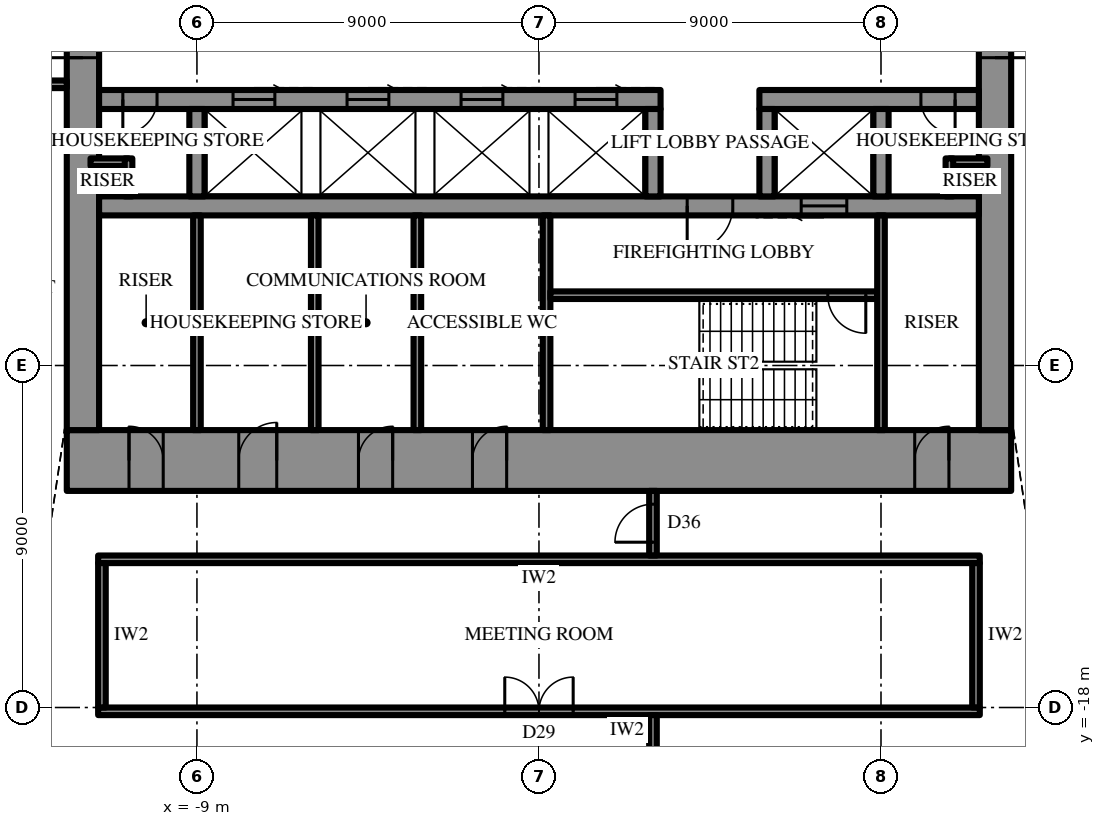
"""IFC4 building model, lengths in metres.
Left out: names, types, materials, properties, quantities, classifications, styles, units other than length and angle.
Written with IfcOpenShell. Run it as: python <this file> out.ifc"""

import sys

from ifc_helpers import new_model, si_unit, direction, frame, frame_2d, origin, place, context, subcontext, project, spatial, rectangle, extrude, element, fill, save


model = new_model("IFC4")
c1 = context("Model", 3, precision=1e-05, world=origin(), true_north=direction((0.0, 1.0)))
c2 = subcontext(c1, "Body", "Model", "MODEL_VIEW")
j1 = project(units=[si_unit("LENGTHUNIT", "METRE"), si_unit("PLANEANGLEUNIT", "RADIAN")], contexts=[c1])
p1 = place(None, origin())
s1 = spatial("IfcSite", under=j1, at=p1, CompositionType="ELEMENT")
p2 = place(p1, origin())
s2 = spatial("IfcBuilding", under=s1, at=p2, CompositionType="ELEMENT")
p3 = place(p2, frame((0.0, 0.0, 353.5)))
s3 = spatial("IfcBuildingStorey", under=s2, at=p3, CompositionType="ELEMENT", Elevation=353.5)
p4 = place(p3, frame((12.425, -11.5, 0.0), z_axis=(0.0, 0.0, 1.0), x_axis=(-1.0, 0.0, 0.0)))
e1 = element("IfcWall", 1, at=p4, inside=s3, PredefinedType="SHEAR", context=c2, shape_type="SweptSolid", body=[
    extrude(rectangle(XDim=24.85, YDim=1.6, at=frame_2d((12.425, 0.0))), origin(), (0.0, 0.0, 1.0), 4.2),
])
p5 = place(p4, frame((13.275, 0.0, 0.0)))
e2 = element("IfcOpeningElement", 2, at=p5, cuts=e1, PredefinedType="OPENING", context=c2, shape_type="SweptSolid", body=[
    extrude(rectangle(XDim=0.9, YDim=2.2, at=frame_2d((0.45, 1.1))), frame((0.0, 0.81, 0.0), z_axis=(0.0, -1.0, 0.0), x_axis=(1.0, 0.0, 0.0)), (0.0, 0.0, 1.0), 1.62),
])
p6 = place(p4, frame((16.275, 0.0, 0.0)))
e3 = element("IfcOpeningElement", 3, at=p6, cuts=e1, PredefinedType="OPENING", context=c2, shape_type="SweptSolid", body=[
    extrude(rectangle(XDim=0.9, YDim=2.2, at=frame_2d((0.45, 1.1))), frame((0.0, 0.81, 0.0), z_axis=(0.0, -1.0, 0.0), x_axis=(1.0, 0.0, 0.0)), (0.0, 0.0, 1.0), 1.62),
])
p7 = place(p4, frame((19.325, 0.0, 0.0)))
e4 = element("IfcOpeningElement", 4, at=p7, cuts=e1, PredefinedType="OPENING", context=c2, shape_type="SweptSolid", body=[
    extrude(rectangle(XDim=1.0, YDim=2.2, at=frame_2d((0.5, 1.1))), frame((0.0, 0.81, 0.0), z_axis=(0.0, -1.0, 0.0), x_axis=(1.0, 0.0, 0.0)), (0.0, 0.0, 1.0), 1.62),
])
p8 = place(p4, frame((1.637, 0.0, 0.0)))
e5 = element("IfcOpeningElement", 5, at=p8, cuts=e1, PredefinedType="OPENING", context=c2, shape_type="SweptSolid", body=[
    extrude(rectangle(XDim=0.9, YDim=2.2, at=frame_2d((0.45, 1.1))), frame((0.0, 0.81, 0.0), z_axis=(0.0, -1.0, 0.0), x_axis=(1.0, 0.0, 0.0)), (0.0, 0.0, 1.0), 1.62),
])
p9 = place(p4, frame((22.312, 0.0, 0.0)))
e6 = element("IfcOpeningElement", 6, at=p9, cuts=e1, PredefinedType="OPENING", context=c2, shape_type="SweptSolid", body=[
    extrude(rectangle(XDim=0.9, YDim=2.2, at=frame_2d((0.45, 1.1))), frame((0.0, 0.81, 0.0), z_axis=(0.0, -1.0, 0.0), x_axis=(1.0, 0.0, 0.0)), (0.0, 0.0, 1.0), 1.62),
])
p10 = place(p3, frame((12.0, -10.7, 0.0), z_axis=(0.0, 0.0, 1.0), x_axis=(0.0, 1.0, 0.0)))
e7 = element("IfcWall", 7, at=p10, inside=s3, PredefinedType="SHEAR", context=c2, shape_type="SweptSolid", body=[
    extrude(rectangle(XDim=21.4, YDim=0.85, at=frame_2d((10.7, 0.0))), origin(), (0.0, 0.0, 1.0), 4.2),
])
p11 = place(p10, frame((9.8, 0.0, 0.0)))
e8 = element("IfcOpeningElement", 8, at=p11, cuts=e7, PredefinedType="OPENING", context=c2, shape_type="SweptSolid", body=[
    extrude(rectangle(XDim=1.8, YDim=2.4, at=frame_2d((0.9, 1.2))), frame((0.0, 0.435, 0.0), z_axis=(0.0, -1.0, 0.0), x_axis=(1.0, 0.0, 0.0)), (0.0, 0.0, 1.0), 0.87),
])
p12 = place(p3, frame((-12.0, 10.7, 0.0), z_axis=(0.0, 0.0, 1.0), x_axis=(0.0, -1.0, 0.0)))
e9 = element("IfcWall", 9, at=p12, inside=s3, PredefinedType="SHEAR", context=c2, shape_type="SweptSolid", body=[
    extrude(rectangle(XDim=21.4, YDim=0.85, at=frame_2d((10.7, 0.0))), origin(), (0.0, 0.0, 1.0), 4.2),
])
p13 = place(p12, frame((9.8, 0.0, 0.0)))
e10 = element("IfcOpeningElement", 10, at=p13, cuts=e9, PredefinedType="OPENING", context=c2, shape_type="SweptSolid", body=[
    extrude(rectangle(XDim=1.8, YDim=2.4, at=frame_2d((0.9, 1.2))), frame((0.0, 0.435, 0.0), z_axis=(0.0, -1.0, 0.0), x_axis=(1.0, 0.0, 0.0)), (0.0, 0.0, 1.0), 0.87),
])
p14 = place(p3, frame((11.575, -2.0, 0.0), z_axis=(0.0, 0.0, 1.0), x_axis=(-1.0, 0.0, 0.0)))
e11 = element("IfcWall", 11, at=p14, inside=s3, PredefinedType="SHEAR", context=c2, shape_type="SweptSolid", body=[
    extrude(rectangle(XDim=5.775, YDim=0.5, at=frame_2d((2.887, 0.0))), origin(), (0.0, 0.0, 1.0), 4.2),
])
p15 = place(p14, frame((0.625, 0.0, 0.0)))
e12 = element("IfcOpeningElement", 12, at=p15, cuts=e11, PredefinedType="OPENING", context=c2, shape_type="SweptSolid", body=[
    extrude(rectangle(XDim=0.9, YDim=2.2, at=frame_2d((0.45, 1.1))), frame((0.0, 0.26, 0.0), z_axis=(0.0, -1.0, 0.0), x_axis=(1.0, 0.0, 0.0)), (0.0, 0.0, 1.0), 0.52),
])
p16 = place(p3, frame((3.2, -2.0, 0.0), z_axis=(0.0, 0.0, 1.0), x_axis=(-1.0, 0.0, 0.0)))
e13 = element("IfcWall", 13, at=p16, inside=s3, PredefinedType="SHEAR", context=c2, shape_type="SweptSolid", body=[
    extrude(rectangle(XDim=14.775, YDim=0.5, at=frame_2d((7.387, 0.0))), origin(), (0.0, 0.0, 1.0), 4.2),
])
p17 = place(p16, frame((13.25, 0.0, 0.0)))
e14 = element("IfcOpeningElement", 14, at=p17, cuts=e13, PredefinedType="OPENING", context=c2, shape_type="SweptSolid", body=[
    extrude(rectangle(XDim=0.9, YDim=2.2, at=frame_2d((0.45, 1.1))), frame((0.0, 0.26, 0.0), z_axis=(0.0, -1.0, 0.0), x_axis=(1.0, 0.0, 0.0)), (0.0, 0.0, 1.0), 0.52),
])
p18 = place(p16, frame((1.15, 0.0, 0.0)))
e15 = element("IfcOpeningElement", 15, at=p18, cuts=e13, PredefinedType="OPENING", context=c2, shape_type="SweptSolid", body=[
    extrude(rectangle(XDim=1.1, YDim=2.2, at=frame_2d((0.55, 1.1))), frame((0.0, 0.26, 0.0), z_axis=(0.0, -1.0, 0.0), x_axis=(1.0, 0.0, 0.0)), (0.0, 0.0, 1.0), 0.52),
])
p19 = place(p16, frame((4.15, 0.0, 0.0)))
e16 = element("IfcOpeningElement", 16, at=p19, cuts=e13, PredefinedType="OPENING", context=c2, shape_type="SweptSolid", body=[
    extrude(rectangle(XDim=1.1, YDim=2.2, at=frame_2d((0.55, 1.1))), frame((0.0, 0.26, 0.0), z_axis=(0.0, -1.0, 0.0), x_axis=(1.0, 0.0, 0.0)), (0.0, 0.0, 1.0), 0.52),
])
p20 = place(p16, frame((7.15, 0.0, 0.0)))
e17 = element("IfcOpeningElement", 17, at=p20, cuts=e13, PredefinedType="OPENING", context=c2, shape_type="SweptSolid", body=[
    extrude(rectangle(XDim=1.1, YDim=2.2, at=frame_2d((0.55, 1.1))), frame((0.0, 0.26, 0.0), z_axis=(0.0, -1.0, 0.0), x_axis=(1.0, 0.0, 0.0)), (0.0, 0.0, 1.0), 0.52),
])
p21 = place(p16, frame((10.15, 0.0, 0.0)))
e18 = element("IfcOpeningElement", 18, at=p21, cuts=e13, PredefinedType="OPENING", context=c2, shape_type="SweptSolid", body=[
    extrude(rectangle(XDim=1.1, YDim=2.2, at=frame_2d((0.55, 1.1))), frame((0.0, 0.26, 0.0), z_axis=(0.0, -1.0, 0.0), x_axis=(1.0, 0.0, 0.0)), (0.0, 0.0, 1.0), 0.52),
])
p22 = place(p3, frame((11.575, -4.8, 0.0), z_axis=(0.0, 0.0, 1.0), x_axis=(-1.0, 0.0, 0.0)))
e19 = element("IfcWall", 19, at=p22, inside=s3, PredefinedType="SHEAR", context=c2, shape_type="SweptSolid", body=[
    extrude(rectangle(XDim=23.15, YDim=0.5, at=frame_2d((11.575, 0.0))), origin(), (0.0, 0.0, 1.0), 4.2),
])
p23 = place(p22, frame((6.475, 0.0, 0.0)))
e20 = element("IfcOpeningElement", 20, at=p23, cuts=e19, PredefinedType="OPENING", context=c2, shape_type="SweptSolid", body=[
    extrude(rectangle(XDim=1.2, YDim=2.2, at=frame_2d((0.6, 1.1))), frame((0.0, 0.26, 0.0), z_axis=(0.0, -1.0, 0.0), x_axis=(1.0, 0.0, 0.0)), (0.0, 0.0, 1.0), 0.52),
])
p24 = place(p22, frame((3.475, 0.0, 0.0)))
e21 = element("IfcOpeningElement", 21, at=p24, cuts=e19, PredefinedType="OPENING", context=c2, shape_type="SweptSolid", body=[
    extrude(rectangle(XDim=1.2, YDim=2.2, at=frame_2d((0.6, 1.1))), frame((0.0, 0.26, 0.0), z_axis=(0.0, -1.0, 0.0), x_axis=(1.0, 0.0, 0.0)), (0.0, 0.0, 1.0), 0.52),
])
for number, where, z_axis, x_axis in (
    (22, (9.0, -2.25, 0.0), (0.0, 0.0, 1.0), (0.0, -1.0, 0.0)),
    (23, (6.0, -2.25, 0.0), (0.0, 0.0, 1.0), (0.0, -1.0, 0.0)),
    (24, (3.0, -2.25, 0.0), (0.0, 0.0, 1.0), (0.0, -1.0, 0.0)),
    (25, (-9.0, -2.25, 0.0), (0.0, 0.0, 1.0), (0.0, -1.0, 0.0)),
):
    element("IfcWall", number, at=place(p3, frame(where, z_axis=z_axis, x_axis=x_axis)), inside=s3, PredefinedType="SHEAR", context=c2, shape_type="SweptSolid", body=[
        extrude(rectangle(XDim=2.3, YDim=0.4, at=frame_2d((1.15, 0.0))), origin(), (0.0, 0.0, 1.0), 4.2),
    ])
p25 = place(p3, frame((0.2, -5.05, 0.0), z_axis=(0.0, 0.0, 1.0), x_axis=(0.0, -1.0, 0.0)))
e26 = element("IfcWall", 26, at=p25, inside=s3, PredefinedType="SHEAR", context=c2, shape_type="SweptSolid", body=[
    extrude(rectangle(XDim=5.65, YDim=0.2, at=frame_2d((2.825, 0.0))), origin(), (0.0, 0.0, 1.0), 4.2),
])
p26 = place(p3, frame((8.9, -7.15, 0.0), z_axis=(0.0, 0.0, 1.0), x_axis=(-1.0, 0.0, 0.0)))
e27 = element("IfcWall", 27, at=p26, inside=s3, PredefinedType="SHEAR", context=c2, shape_type="SweptSolid", body=[
    extrude(rectangle(XDim=8.6, YDim=0.2, at=frame_2d((4.3, 0.0))), origin(), (0.0, 0.0, 1.0), 4.2),
])
p27 = place(p26, frame((0.3, 0.0, 0.0)))
e28 = element("IfcOpeningElement", 28, at=p27, cuts=e27, PredefinedType="OPENING", context=c2, shape_type="SweptSolid", body=[
    extrude(rectangle(XDim=1.0, YDim=2.2, at=frame_2d((0.5, 1.1))), frame((0.0, 0.11, 0.0), z_axis=(0.0, -1.0, 0.0), x_axis=(1.0, 0.0, 0.0)), (0.0, 0.0, 1.0), 0.22),
])
for number, where, z_axis, x_axis in (
    (29, (9.0, -5.05, 0.0), (0.0, 0.0, 1.0), (0.0, -1.0, 0.0)),
    (30, (-9.0, -5.05, 0.0), (0.0, 0.0, 1.0), (0.0, -1.0, 0.0)),
    (31, (-3.2, -5.05, 0.0), (0.0, 0.0, 1.0), (0.0, -1.0, 0.0)),
    (32, (-5.9, -5.05, 0.0), (0.0, 0.0, 1.0), (0.0, -1.0, 0.0)),
):
    element("IfcWall", number, at=place(p3, frame(where, z_axis=z_axis, x_axis=x_axis)), inside=s3, PredefinedType="PARTITIONING", context=c2, shape_type="SweptSolid", body=[
        extrude(rectangle(XDim=5.65, YDim=0.2, at=frame_2d((2.825, 0.0))), origin(), (0.0, 0.0, 1.0), 4.0),
    ])
for number, where, z_axis, x_axis in (
    (33, (11.8, -3.65, 0.0), (0.0, 0.0, 1.0), (-1.0, 0.0, 0.0)),
    (34, (10.8, -3.55, 0.0), (0.0, 0.0, 1.0), (0.0, -1.0, 0.0)),
    (35, (-10.8, -3.65, 0.0), (0.0, 0.0, 1.0), (-1.0, 0.0, 0.0)),
    (36, (-10.8, -3.55, 0.0), (0.0, 0.0, 1.0), (0.0, -1.0, 0.0)),
):
    element("IfcWall", number, at=place(p3, frame(where, z_axis=z_axis, x_axis=x_axis)), inside=s3, PredefinedType="PARTITIONING", context=c2, shape_type="SweptSolid", body=[
        extrude(rectangle(XDim=1.0, YDim=0.2, at=frame_2d((0.5, 0.0))), origin(), (0.0, 0.0, 1.0), 4.0),
    ])
p28 = place(p3, frame((11.6, -14.1, 0.0), z_axis=(0.0, 0.0, 1.0), x_axis=(-1.0, 0.0, 0.0)))
e37 = element("IfcWall", 37, at=p28, inside=s3, PredefinedType="PARTITIONING", context=c2, shape_type="SweptSolid", body=[
    extrude(rectangle(XDim=23.2, YDim=0.2, at=frame_2d((11.6, 0.0))), origin(), (0.0, 0.0, 1.0), 4.0),
])
p29 = place(p3, frame((11.6, -18.1, 0.0), z_axis=(0.0, 0.0, 1.0), x_axis=(-1.0, 0.0, 0.0)))
e38 = element("IfcWall", 38, at=p29, inside=s3, PredefinedType="PARTITIONING", context=c2, shape_type="SweptSolid", body=[
    extrude(rectangle(XDim=23.2, YDim=0.2, at=frame_2d((11.6, 0.0))), origin(), (0.0, 0.0, 1.0), 4.0),
])
p30 = place(p29, frame((10.7, 0.0, 0.0)))
e39 = element("IfcOpeningElement", 39, at=p30, cuts=e38, PredefinedType="OPENING", context=c2, shape_type="SweptSolid", body=[
    extrude(rectangle(XDim=1.8, YDim=2.4, at=frame_2d((0.9, 1.2))), frame((0.0, 0.11, 0.0), z_axis=(0.0, -1.0, 0.0), x_axis=(1.0, 0.0, 0.0)), (0.0, 0.0, 1.0), 0.22),
])
for number, where, z_axis, x_axis in (
    (40, (11.5, -14.2, 0.0), (0.0, 0.0, 1.0), (0.0, -1.0, 0.0)),
    (41, (-11.5, -14.2, 0.0), (0.0, 0.0, 1.0), (0.0, -1.0, 0.0)),
):
    element("IfcWall", number, at=place(p3, frame(where, z_axis=z_axis, x_axis=x_axis)), inside=s3, PredefinedType="PARTITIONING", context=c2, shape_type="SweptSolid", body=[
        extrude(rectangle(XDim=3.8, YDim=0.2, at=frame_2d((1.9, 0.0))), origin(), (0.0, 0.0, 1.0), 4.0),
    ])
p31 = place(p3, frame((3.0, -12.3, 0.0), z_axis=(0.0, 0.0, 1.0), x_axis=(0.0, -1.0, 0.0)))
e42 = element("IfcWall", 42, at=p31, inside=s3, PredefinedType="PARTITIONING", context=c2, shape_type="SweptSolid", body=[
    extrude(rectangle(XDim=1.7, YDim=0.2, at=frame_2d((0.85, 0.0))), origin(), (0.0, 0.0, 1.0), 4.0),
])
p32 = place(p31, frame((0.35, 0.0, 0.0)))
e43 = element("IfcOpeningElement", 43, at=p32, cuts=e42, PredefinedType="OPENING", context=c2, shape_type="SweptSolid", body=[
    extrude(rectangle(XDim=1.0, YDim=2.2, at=frame_2d((0.5, 1.1))), frame((0.0, 0.11, 0.0), z_axis=(0.0, -1.0, 0.0), x_axis=(1.0, 0.0, 0.0)), (0.0, 0.0, 1.0), 0.22),
])
p33 = place(p3, frame((3.0, -18.2, 0.0), z_axis=(0.0, 0.0, 1.0), x_axis=(0.0, -1.0, 0.0)))
e44 = element("IfcWall", 44, at=p33, inside=s3, PredefinedType="PARTITIONING", context=c2, shape_type="SweptSolid", body=[
    extrude(rectangle(XDim=8.35, YDim=0.2, at=frame_2d((4.175, 0.0))), origin(), (0.0, 0.0, 1.0), 4.0),
])
p34 = place(p3, frame((-12.425, -1.6, 0.0), z_axis=(0.0, 0.0, 1.0), x_axis=(-1.0, 0.0, 0.0)))
e45 = element("IfcWall", 45, at=p34, inside=s3, PredefinedType="PARTITIONING", context=c2, shape_type="SweptSolid", body=[
    extrude(rectangle(XDim=16.5, YDim=0.2, at=frame_2d((8.25, 0.0))), origin(), (0.0, 0.0, 1.0), 4.0),
])
p35 = place(p34, frame((1.15, 0.0, 0.0)))
e46 = element("IfcOpeningElement", 46, at=p35, cuts=e45, PredefinedType="OPENING", context=c2, shape_type="SweptSolid", body=[
    extrude(rectangle(XDim=1.0, YDim=2.2, at=frame_2d((0.5, 1.1))), frame((0.0, 0.11, 0.0), z_axis=(0.0, -1.0, 0.0), x_axis=(1.0, 0.0, 0.0)), (0.0, 0.0, 1.0), 0.22),
])
p36 = place(p11, frame((1.8, 0.0, 0.0), z_axis=(0.0, 0.0, 1.0), x_axis=(-1.0, 0.0, 0.0)))
e47 = element("IfcDoor", 47, at=p36, inside=s3, OperationType="DOUBLE_DOOR_SINGLE_SWING", PredefinedType="DOOR", context=c2, shape_type="SweptSolid", body=[
    extrude(rectangle(XDim=1.8, YDim=2.4, at=frame_2d((0.9, 1.2))), frame((0.0, 0.025, 0.0), z_axis=(0.0, -1.0, 0.0), x_axis=(1.0, 0.0, 0.0)), (0.0, 0.0, 1.0), 0.05),
])
fill(e8, e47)
p37 = place(p13, frame((1.8, 0.0, 0.0), z_axis=(0.0, 0.0, 1.0), x_axis=(-1.0, 0.0, 0.0)))
e48 = element("IfcDoor", 48, at=p37, inside=s3, OperationType="DOUBLE_DOOR_SINGLE_SWING", PredefinedType="DOOR", context=c2, shape_type="SweptSolid", body=[
    extrude(rectangle(XDim=1.8, YDim=2.4, at=frame_2d((0.9, 1.2))), frame((0.0, 0.025, 0.0), z_axis=(0.0, -1.0, 0.0), x_axis=(1.0, 0.0, 0.0)), (0.0, 0.0, 1.0), 0.05),
])
fill(e10, e48)
p38 = place(p23, origin())
e49 = element("IfcDoor", 49, at=p38, inside=s3, OperationType="SINGLE_SWING_LEFT", PredefinedType="DOOR", context=c2, shape_type="SweptSolid", body=[
    extrude(rectangle(XDim=1.2, YDim=2.2, at=frame_2d((0.6, 1.1))), frame((0.0, 0.025, 0.0), z_axis=(0.0, -1.0, 0.0), x_axis=(1.0, 0.0, 0.0)), (0.0, 0.0, 1.0), 0.05),
])
fill(e20, e49)
p39 = place(p27, origin())
e50 = element("IfcDoor", 50, at=p39, inside=s3, OperationType="SINGLE_SWING_RIGHT", PredefinedType="DOOR", context=c2, shape_type="SweptSolid", body=[
    extrude(rectangle(XDim=1.0, YDim=2.2, at=frame_2d((0.5, 1.1))), frame((0.0, 0.025, 0.0), z_axis=(0.0, -1.0, 0.0), x_axis=(1.0, 0.0, 0.0)), (0.0, 0.0, 1.0), 0.05),
])
fill(e28, e50)
p40 = place(p5, frame((0.9, 0.0, 0.0), z_axis=(0.0, 0.0, 1.0), x_axis=(-1.0, 0.0, 0.0)))
e51 = element("IfcDoor", 51, at=p40, inside=s3, OperationType="SINGLE_SWING_LEFT", PredefinedType="DOOR", context=c2, shape_type="SweptSolid", body=[
    extrude(rectangle(XDim=0.9, YDim=2.2, at=frame_2d((0.45, 1.1))), frame((0.0, 0.025, 0.0), z_axis=(0.0, -1.0, 0.0), x_axis=(1.0, 0.0, 0.0)), (0.0, 0.0, 1.0), 0.05),
])
fill(e2, e51)
p41 = place(p6, frame((0.9, 0.0, 0.0), z_axis=(0.0, 0.0, 1.0), x_axis=(-1.0, 0.0, 0.0)))
e52 = element("IfcDoor", 52, at=p41, inside=s3, OperationType="SINGLE_SWING_LEFT", PredefinedType="DOOR", context=c2, shape_type="SweptSolid", body=[
    extrude(rectangle(XDim=0.9, YDim=2.2, at=frame_2d((0.45, 1.1))), frame((0.0, 0.025, 0.0), z_axis=(0.0, -1.0, 0.0), x_axis=(1.0, 0.0, 0.0)), (0.0, 0.0, 1.0), 0.05),
])
fill(e3, e52)
p42 = place(p7, frame((1.0, 0.0, 0.0), z_axis=(0.0, 0.0, 1.0), x_axis=(-1.0, 0.0, 0.0)))
e53 = element("IfcDoor", 53, at=p42, inside=s3, OperationType="SINGLE_SWING_LEFT", PredefinedType="DOOR", context=c2, shape_type="SweptSolid", body=[
    extrude(rectangle(XDim=1.0, YDim=2.2, at=frame_2d((0.5, 1.1))), frame((0.0, 0.025, 0.0), z_axis=(0.0, -1.0, 0.0), x_axis=(1.0, 0.0, 0.0)), (0.0, 0.0, 1.0), 0.05),
])
fill(e4, e53)
p43 = place(p8, frame((0.9, 0.0, 0.0), z_axis=(0.0, 0.0, 1.0), x_axis=(-1.0, 0.0, 0.0)))
e54 = element("IfcDoor", 54, at=p43, inside=s3, OperationType="SINGLE_SWING_LEFT", PredefinedType="DOOR", context=c2, shape_type="SweptSolid", body=[
    extrude(rectangle(XDim=0.9, YDim=2.2, at=frame_2d((0.45, 1.1))), frame((0.0, 0.025, 0.0), z_axis=(0.0, -1.0, 0.0), x_axis=(1.0, 0.0, 0.0)), (0.0, 0.0, 1.0), 0.05),
])
fill(e5, e54)
p44 = place(p9, frame((0.9, 0.0, 0.0), z_axis=(0.0, 0.0, 1.0), x_axis=(-1.0, 0.0, 0.0)))
e55 = element("IfcDoor", 55, at=p44, inside=s3, OperationType="SINGLE_SWING_RIGHT", PredefinedType="DOOR", context=c2, shape_type="SweptSolid", body=[
    extrude(rectangle(XDim=0.9, YDim=2.2, at=frame_2d((0.45, 1.1))), frame((0.0, 0.025, 0.0), z_axis=(0.0, -1.0, 0.0), x_axis=(1.0, 0.0, 0.0)), (0.0, 0.0, 1.0), 0.05),
])
fill(e6, e55)
p45 = place(p15, origin())
e56 = element("IfcDoor", 56, at=p45, inside=s3, OperationType="SINGLE_SWING_RIGHT", PredefinedType="DOOR", context=c2, shape_type="SweptSolid", body=[
    extrude(rectangle(XDim=0.9, YDim=2.2, at=frame_2d((0.45, 1.1))), frame((0.0, 0.025, 0.0), z_axis=(0.0, -1.0, 0.0), x_axis=(1.0, 0.0, 0.0)), (0.0, 0.0, 1.0), 0.05),
])
fill(e12, e56)
p46 = place(p17, origin())
e57 = element("IfcDoor", 57, at=p46, inside=s3, OperationType="SINGLE_SWING_LEFT", PredefinedType="DOOR", context=c2, shape_type="SweptSolid", body=[
    extrude(rectangle(XDim=0.9, YDim=2.2, at=frame_2d((0.45, 1.1))), frame((0.0, 0.025, 0.0), z_axis=(0.0, -1.0, 0.0), x_axis=(1.0, 0.0, 0.0)), (0.0, 0.0, 1.0), 0.05),
])
fill(e14, e57)
p47 = place(p24, origin())
e58 = element("IfcDoor", 58, at=p47, inside=s3, OperationType="SLIDING_TO_LEFT", PredefinedType="DOOR", context=c2, shape_type="SweptSolid", body=[
    extrude(rectangle(XDim=1.2, YDim=2.2, at=frame_2d((0.6, 1.1))), frame((0.0, 0.025, 0.0), z_axis=(0.0, -1.0, 0.0), x_axis=(1.0, 0.0, 0.0)), (0.0, 0.0, 1.0), 0.05),
])
fill(e21, e58)
p48 = place(p18, frame((1.1, 0.0, 0.0), z_axis=(0.0, 0.0, 1.0), x_axis=(-1.0, 0.0, 0.0)))
e59 = element("IfcDoor", 59, at=p48, inside=s3, OperationType="SLIDING_TO_LEFT", PredefinedType="DOOR", context=c2, shape_type="SweptSolid", body=[
    extrude(rectangle(XDim=1.1, YDim=2.2, at=frame_2d((0.55, 1.1))), frame((0.0, 0.025, 0.0), z_axis=(0.0, -1.0, 0.0), x_axis=(1.0, 0.0, 0.0)), (0.0, 0.0, 1.0), 0.05),
])
fill(e15, e59)
p49 = place(p19, frame((1.1, 0.0, 0.0), z_axis=(0.0, 0.0, 1.0), x_axis=(-1.0, 0.0, 0.0)))
e60 = element("IfcDoor", 60, at=p49, inside=s3, OperationType="SLIDING_TO_LEFT", PredefinedType="DOOR", context=c2, shape_type="SweptSolid", body=[
    extrude(rectangle(XDim=1.1, YDim=2.2, at=frame_2d((0.55, 1.1))), frame((0.0, 0.025, 0.0), z_axis=(0.0, -1.0, 0.0), x_axis=(1.0, 0.0, 0.0)), (0.0, 0.0, 1.0), 0.05),
])
fill(e16, e60)
p50 = place(p20, frame((1.1, 0.0, 0.0), z_axis=(0.0, 0.0, 1.0), x_axis=(-1.0, 0.0, 0.0)))
e61 = element("IfcDoor", 61, at=p50, inside=s3, OperationType="SLIDING_TO_LEFT", PredefinedType="DOOR", context=c2, shape_type="SweptSolid", body=[
    extrude(rectangle(XDim=1.1, YDim=2.2, at=frame_2d((0.55, 1.1))), frame((0.0, 0.025, 0.0), z_axis=(0.0, -1.0, 0.0), x_axis=(1.0, 0.0, 0.0)), (0.0, 0.0, 1.0), 0.05),
])
fill(e17, e61)
p51 = place(p21, frame((1.1, 0.0, 0.0), z_axis=(0.0, 0.0, 1.0), x_axis=(-1.0, 0.0, 0.0)))
e62 = element("IfcDoor", 62, at=p51, inside=s3, OperationType="SLIDING_TO_LEFT", PredefinedType="DOOR", context=c2, shape_type="SweptSolid", body=[
    extrude(rectangle(XDim=1.1, YDim=2.2, at=frame_2d((0.55, 1.1))), frame((0.0, 0.025, 0.0), z_axis=(0.0, -1.0, 0.0), x_axis=(1.0, 0.0, 0.0)), (0.0, 0.0, 1.0), 0.05),
])
fill(e18, e62)
p52 = place(p30, frame((1.8, 0.0, 0.0), z_axis=(0.0, 0.0, 1.0), x_axis=(-1.0, 0.0, 0.0)))
e63 = element("IfcDoor", 63, at=p52, inside=s3, OperationType="DOUBLE_DOOR_SINGLE_SWING", PredefinedType="DOOR", context=c2, shape_type="SweptSolid", body=[
    extrude(rectangle(XDim=1.8, YDim=2.4, at=frame_2d((0.9, 1.2))), frame((0.0, 0.025, 0.0), z_axis=(0.0, -1.0, 0.0), x_axis=(1.0, 0.0, 0.0)), (0.0, 0.0, 1.0), 0.05),
])
fill(e39, e63)
p53 = place(p32, frame((1.0, 0.0, 0.0), z_axis=(0.0, 0.0, 1.0), x_axis=(-1.0, 0.0, 0.0)))
e64 = element("IfcDoor", 64, at=p53, inside=s3, OperationType="SINGLE_SWING_RIGHT", PredefinedType="DOOR", context=c2, shape_type="SweptSolid", body=[
    extrude(rectangle(XDim=1.0, YDim=2.2, at=frame_2d((0.5, 1.1))), frame((0.0, 0.025, 0.0), z_axis=(0.0, -1.0, 0.0), x_axis=(1.0, 0.0, 0.0)), (0.0, 0.0, 1.0), 0.05),
])
fill(e43, e64)
save(model, sys.argv[1])
